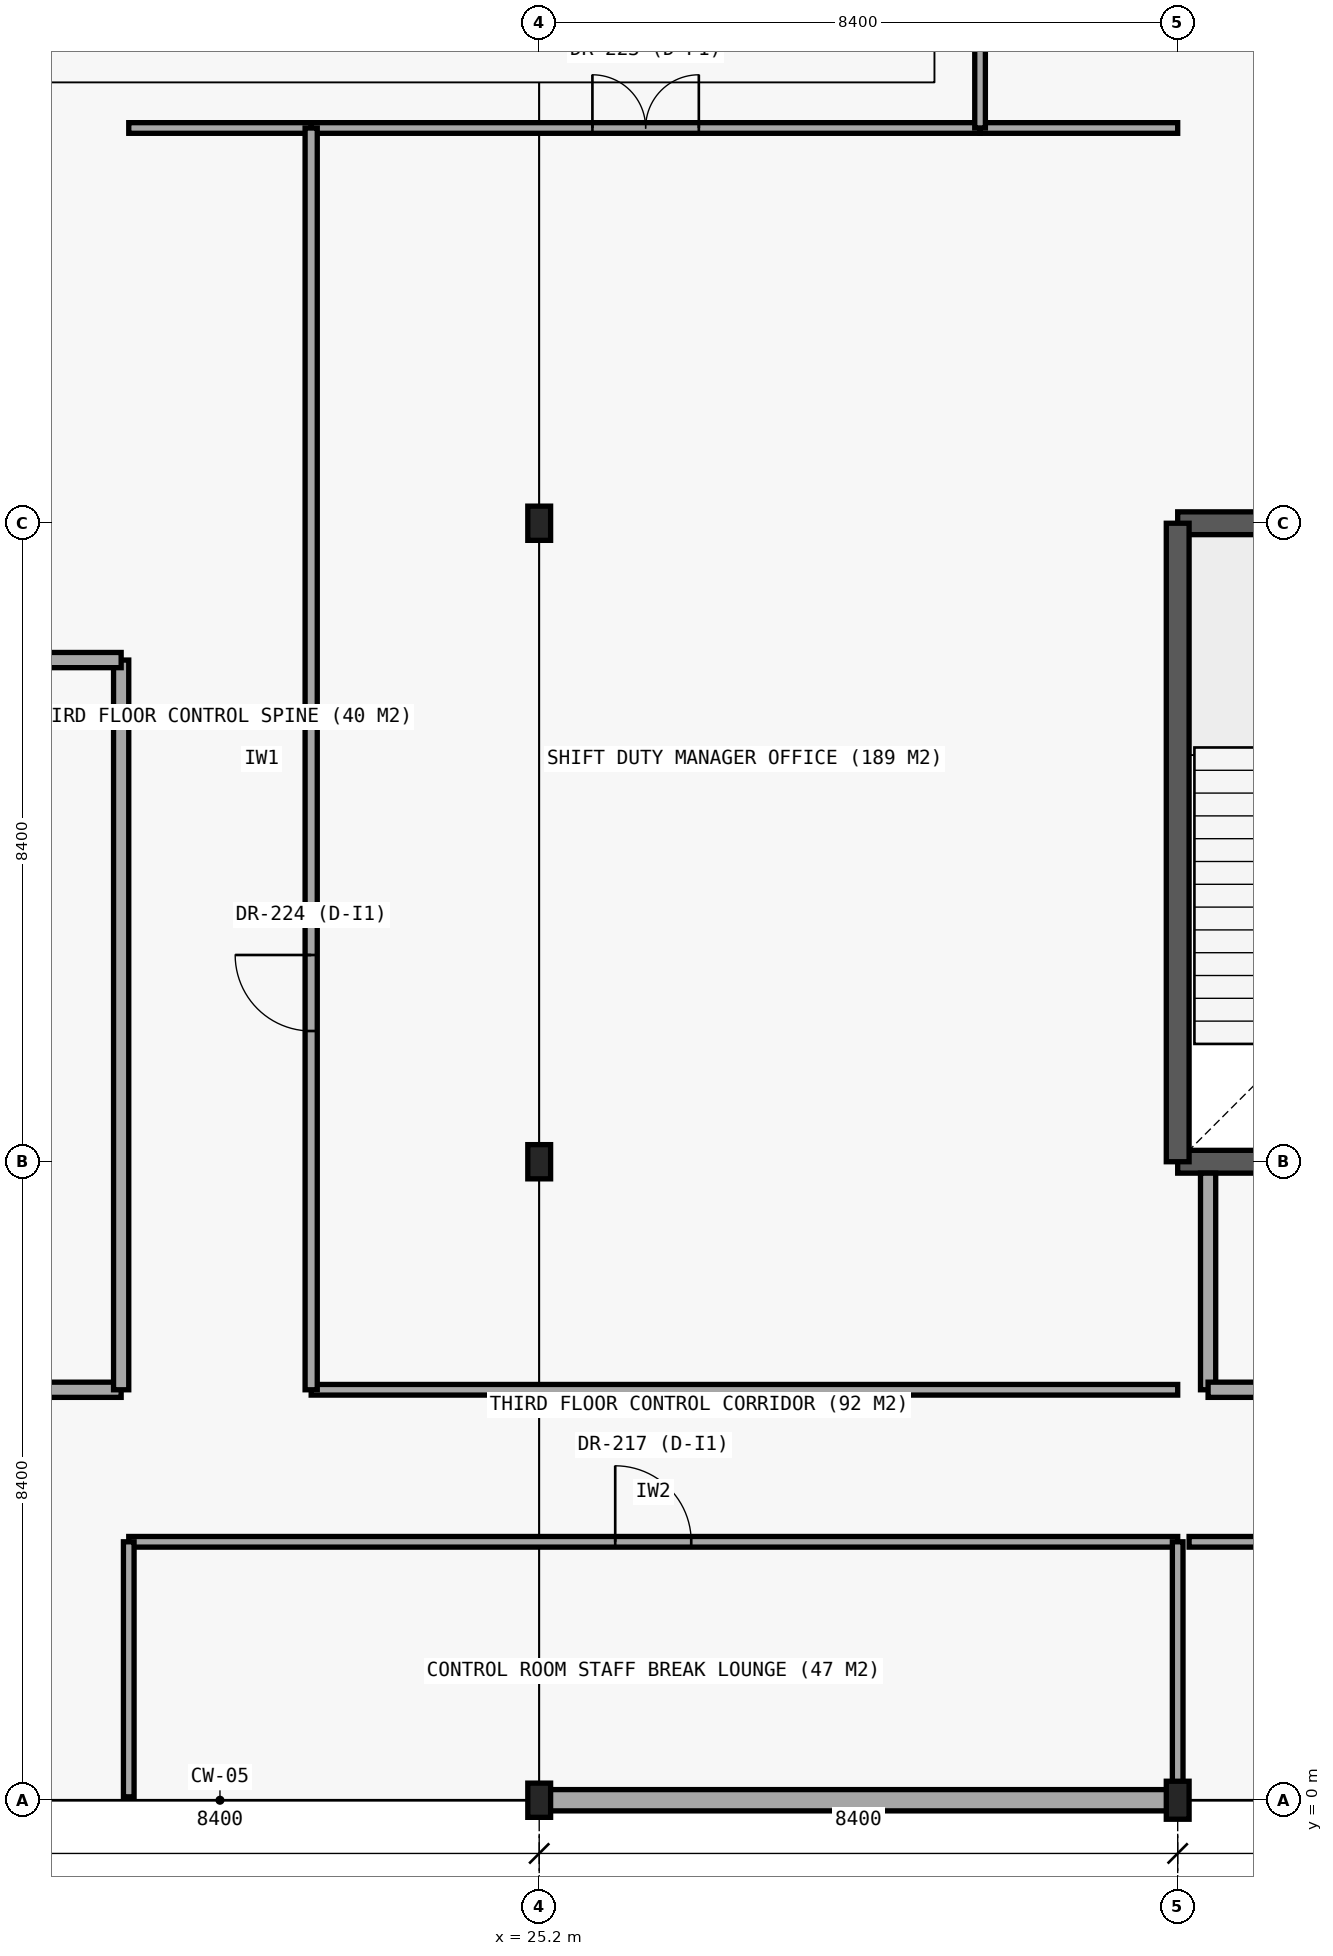
"""IFC4 building model, lengths in metres.
Left out: names, types, materials, properties, quantities, classifications, styles, units other than length and angle.
Written with IfcOpenShell. Run it as: python <this file> out.ifc"""

import sys

from ifc_helpers import new_model, si_unit, direction, frame, frame_2d, origin, origin_2d, place, context, subcontext, project, spatial, rectangle, i_section, extrude, element, fill, save


model = new_model("IFC4")
c1 = context("Model", 3, precision=1e-05, world=origin(), true_north=direction((0.0, 1.0)))
c2 = subcontext(c1, "Body", "Model", "MODEL_VIEW")
j1 = project(units=[si_unit("LENGTHUNIT", "METRE"), si_unit("PLANEANGLEUNIT", "RADIAN")], contexts=[c1])
p1 = place(None, origin())
s1 = spatial("IfcSite", under=j1, at=p1, CompositionType="ELEMENT")
p2 = place(p1, origin())
s2 = spatial("IfcBuilding", under=s1, at=p2, CompositionType="ELEMENT")
p3 = place(p2, frame((0.0, 0.0, 13.2)))
s3 = spatial("IfcBuildingStorey", under=s2, at=p3, CompositionType="ELEMENT", Elevation=13.2)
p4 = place(p3, frame((33.6, 8.4, 0.0), z_axis=(0.0, 0.0, 1.0), x_axis=(1.0, 0.0, 0.0)))
e1 = element("IfcWall", 1, at=p4, inside=s3, PredefinedType="SHEAR", context=c2, shape_type="SweptSolid", body=[
    extrude(rectangle(XDim=8.4, YDim=0.3, at=frame_2d((4.2, 0.0))), origin(), (0.0, 0.0, 1.0), 4.2),
])
p5 = place(p4, frame((1.8, 0.0, 0.0)))
e2 = element("IfcOpeningElement", 2, at=p5, cuts=e1, PredefinedType="OPENING", context=c2, shape_type="SweptSolid", body=[
    extrude(rectangle(XDim=1.35, YDim=2.2, at=frame_2d((0.675, 1.1))), frame((0.0, 0.16, 0.0), z_axis=(0.0, -1.0, 0.0), x_axis=(1.0, 0.0, 0.0)), (0.0, 0.0, 1.0), 0.32),
])
p6 = place(p4, frame((6.0, 0.0, 0.0)))
e3 = element("IfcOpeningElement", 3, at=p6, cuts=e1, PredefinedType="OPENING", context=c2, shape_type="SweptSolid", body=[
    extrude(rectangle(XDim=1.1, YDim=2.2, at=frame_2d((0.55, 1.1))), frame((0.0, 0.16, 0.0), z_axis=(0.0, -1.0, 0.0), x_axis=(1.0, 0.0, 0.0)), (0.0, 0.0, 1.0), 0.32),
])
p7 = place(p3, frame((42.0, 16.8, 0.0), z_axis=(0.0, 0.0, 1.0), x_axis=(-1.0, 0.0, 0.0)))
e4 = element("IfcWall", 4, at=p7, inside=s3, PredefinedType="SHEAR", context=c2, shape_type="SweptSolid", body=[
    extrude(rectangle(XDim=8.4, YDim=0.3, at=frame_2d((4.2, 0.0))), origin(), (0.0, 0.0, 1.0), 4.2),
])
p8 = place(p3, frame((33.6, 16.8, 0.0), z_axis=(0.0, 0.0, 1.0), x_axis=(0.0, -1.0, 0.0)))
e5 = element("IfcWall", 5, at=p8, inside=s3, PredefinedType="SHEAR", context=c2, shape_type="SweptSolid", body=[
    extrude(rectangle(XDim=8.4, YDim=0.3, at=frame_2d((4.2, 0.0))), origin(), (0.0, 0.0, 1.0), 4.2),
])
for number, where, z_axis, x_axis in (
    (6, (25.2, 0.0, 0.0), (0.0, 0.0, 1.0), (1.0, 0.0, 0.0)),
    (7, (25.2, 8.4, 0.0), (0.0, 0.0, 1.0), (1.0, 0.0, 0.0)),
    (8, (25.2, 16.8, 0.0), (0.0, 0.0, 1.0), (1.0, 0.0, 0.0)),
):
    element("IfcColumn", number, at=place(p3, frame(where, z_axis=z_axis, x_axis=x_axis)), inside=s3, PredefinedType="COLUMN", context=c2, shape_type="SweptSolid", body=[
        extrude(i_section(OverallWidth=0.3, OverallDepth=0.45, WebThickness=0.014, FlangeThickness=0.026, FilletRadius=0.027, at=origin_2d()), origin(), (0.0, 0.0, 1.0), 4.2),
    ])
p9 = place(p3, frame((33.6, 0.0, 0.0), z_axis=(0.0, 0.0, 1.0), x_axis=(1.0, 0.0, 0.0)))
e9 = element("IfcColumn", 9, at=p9, inside=s3, PredefinedType="COLUMN", context=c2, shape_type="SweptSolid", body=[
    extrude(i_section(OverallWidth=0.3, OverallDepth=0.5, WebThickness=0.014, FlangeThickness=0.028, FilletRadius=0.027, at=origin_2d()), origin(), (0.0, 0.0, 1.0), 4.2),
])
p10 = place(p3, frame((25.2, 0.0, 0.0), z_axis=(0.0, 0.0, 1.0), x_axis=(1.0, 0.0, 0.0)))
e10 = element("IfcWall", 10, at=p10, inside=s3, PredefinedType="STANDARD", context=c2, shape_type="SweptSolid", body=[
    extrude(rectangle(XDim=8.4, YDim=0.28, at=frame_2d((4.2, 0.0))), origin(), (0.0, 0.0, 1.0), 3.62),
])
p11 = place(p3, frame((8.8, 5.4, 0.0), z_axis=(0.0, 0.0, 1.0), x_axis=(1.0, 0.0, 0.0)))
e11 = element("IfcWall", 11, at=p11, inside=s3, PredefinedType="PARTITIONING", context=c2, shape_type="SweptSolid", body=[
    extrude(rectangle(XDim=10.9, YDim=0.2, at=frame_2d((5.45, 0.0))), origin(), (0.0, 0.0, 1.0), 3.52),
])
p12 = place(p11, frame((3.2, 0.0, 0.0)))
e12 = element("IfcOpeningElement", 12, at=p12, cuts=e11, PredefinedType="OPENING", context=c2, shape_type="SweptSolid", body=[
    extrude(rectangle(XDim=1.5, YDim=2.2, at=frame_2d((0.75, 1.1))), frame((0.0, 0.11, 0.0), z_axis=(0.0, -1.0, 0.0), x_axis=(1.0, 0.0, 0.0)), (0.0, 0.0, 1.0), 0.22),
])
p13 = place(p3, frame((19.7, 5.4, 0.0), z_axis=(0.0, 0.0, 1.0), x_axis=(0.0, 1.0, 0.0)))
e13 = element("IfcWall", 13, at=p13, inside=s3, PredefinedType="PARTITIONING", context=c2, shape_type="SweptSolid", body=[
    extrude(rectangle(XDim=9.6, YDim=0.2, at=frame_2d((4.8, 0.0))), origin(), (0.0, 0.0, 1.0), 3.52),
])
p14 = place(p3, frame((16.96, 15.0, 0.0), z_axis=(0.0, 0.0, 1.0), x_axis=(1.0, 0.0, 0.0)))
e14 = element("IfcWall", 14, at=p14, inside=s3, PredefinedType="PARTITIONING", context=c2, shape_type="SweptSolid", body=[
    extrude(rectangle(XDim=2.74, YDim=0.2, at=frame_2d((1.37, 0.0))), origin(), (0.0, 0.0, 1.0), 3.52),
])
p15 = place(p3, frame((34.0, 5.4, 0.0), z_axis=(0.0, 0.0, 1.0), x_axis=(0.0, 1.0, 0.0)))
e15 = element("IfcWall", 15, at=p15, inside=s3, PredefinedType="PARTITIONING", context=c2, shape_type="SweptSolid", body=[
    extrude(rectangle(XDim=2.85, YDim=0.2, at=frame_2d((1.425, 0.0))), origin(), (0.0, 0.0, 1.0), 3.49),
])
p16 = place(p3, frame((34.0, 5.4, 0.0), z_axis=(0.0, 0.0, 1.0), x_axis=(1.0, 0.0, 0.0)))
e16 = element("IfcWall", 16, at=p16, inside=s3, PredefinedType="PARTITIONING", context=c2, shape_type="SweptSolid", body=[
    extrude(rectangle(XDim=7.6, YDim=0.2, at=frame_2d((3.8, 0.0))), origin(), (0.0, 0.0, 1.0), 3.52),
])
p17 = place(p16, frame((3.05, 0.0, 0.0)))
e17 = element("IfcOpeningElement", 17, at=p17, cuts=e16, PredefinedType="OPENING", context=c2, shape_type="SweptSolid", body=[
    extrude(rectangle(XDim=1.5, YDim=2.2, at=frame_2d((0.75, 1.1))), frame((0.0, 0.11, 0.0), z_axis=(0.0, -1.0, 0.0), x_axis=(1.0, 0.0, 0.0)), (0.0, 0.0, 1.0), 0.22),
])
p18 = place(p3, frame((19.8, 3.4, 0.0), z_axis=(0.0, 0.0, 1.0), x_axis=(1.0, 0.0, 0.0)))
e18 = element("IfcWall", 18, at=p18, inside=s3, PredefinedType="PARTITIONING", context=c2, shape_type="SweptSolid", body=[
    extrude(rectangle(XDim=13.8, YDim=0.14, at=frame_2d((6.9, 0.0))), origin(), (0.0, 0.0, 1.0), 3.5),
])
p19 = place(p18, frame((6.4, 0.0, 0.0)))
e19 = element("IfcOpeningElement", 19, at=p19, cuts=e18, PredefinedType="OPENING", context=c2, shape_type="SweptSolid", body=[
    extrude(rectangle(XDim=1.0, YDim=2.15, at=frame_2d((0.5, 1.075))), frame((0.0, 0.08, 0.0), z_axis=(0.0, -1.0, 0.0), x_axis=(1.0, 0.0, 0.0)), (0.0, 0.0, 1.0), 0.16),
])
p20 = place(p3, frame((33.75, 3.4, 0.0), z_axis=(0.0, 0.0, 1.0), x_axis=(1.0, 0.0, 0.0)))
e20 = element("IfcWall", 20, at=p20, inside=s3, PredefinedType="PARTITIONING", context=c2, shape_type="SweptSolid", body=[
    extrude(rectangle(XDim=8.25, YDim=0.14, at=frame_2d((4.125, 0.0))), origin(), (0.0, 0.0, 1.0), 3.5),
])
p21 = place(p20, frame((1.92, 0.0, 0.0)))
e21 = element("IfcOpeningElement", 21, at=p21, cuts=e20, PredefinedType="OPENING", context=c2, shape_type="SweptSolid", body=[
    extrude(rectangle(XDim=1.15, YDim=2.15, at=frame_2d((0.575, 1.075))), frame((0.0, 0.08, 0.0), z_axis=(0.0, -1.0, 0.0), x_axis=(1.0, 0.0, 0.0)), (0.0, 0.0, 1.0), 0.16),
])
p22 = place(p3, frame((22.2, 5.4, 0.0), z_axis=(0.0, 0.0, 1.0), x_axis=(1.0, 0.0, 0.0)))
e22 = element("IfcWall", 22, at=p22, inside=s3, PredefinedType="PARTITIONING", context=c2, shape_type="SweptSolid", body=[
    extrude(rectangle(XDim=11.4, YDim=0.14, at=frame_2d((5.7, 0.0))), origin(), (0.0, 0.0, 1.0), 3.5),
])
p23 = place(p3, frame((19.8, 22.0, 0.0), z_axis=(0.0, 0.0, 1.0), x_axis=(1.0, 0.0, 0.0)))
e23 = element("IfcWall", 23, at=p23, inside=s3, PredefinedType="PARTITIONING", context=c2, shape_type="SweptSolid", body=[
    extrude(rectangle(XDim=2.4, YDim=0.14, at=frame_2d((1.2, 0.0))), origin(), (0.0, 0.0, 1.0), 3.5),
])
p24 = place(p3, frame((22.2, 22.0, 0.0), z_axis=(0.0, 0.0, 1.0), x_axis=(1.0, 0.0, 0.0)))
e24 = element("IfcWall", 24, at=p24, inside=s3, PredefinedType="PARTITIONING", context=c2, shape_type="SweptSolid", body=[
    extrude(rectangle(XDim=8.8, YDim=0.14, at=frame_2d((4.4, 0.0))), origin(), (0.0, 0.0, 1.0), 3.5),
])
p25 = place(p24, frame((3.7, 0.0, 0.0)))
e25 = element("IfcOpeningElement", 25, at=p25, cuts=e24, PredefinedType="OPENING", context=c2, shape_type="SweptSolid", body=[
    extrude(rectangle(XDim=1.4, YDim=2.25, at=frame_2d((0.7, 1.125))), frame((0.0, 0.08, 0.0), z_axis=(0.0, -1.0, 0.0), x_axis=(1.0, 0.0, 0.0)), (0.0, 0.0, 1.0), 0.16),
])
p26 = place(p3, frame((31.0, 22.0, 0.0), z_axis=(0.0, 0.0, 1.0), x_axis=(1.0, 0.0, 0.0)))
e26 = element("IfcWall", 26, at=p26, inside=s3, PredefinedType="PARTITIONING", context=c2, shape_type="SweptSolid", body=[
    extrude(rectangle(XDim=2.6, YDim=0.14, at=frame_2d((1.3, 0.0))), origin(), (0.0, 0.0, 1.0), 3.5),
])
p27 = place(p3, frame((19.8, 0.045, 0.0), z_axis=(0.0, 0.0, 1.0), x_axis=(0.0, 1.0, 0.0)))
e27 = element("IfcWall", 27, at=p27, inside=s3, PredefinedType="PARTITIONING", context=c2, shape_type="SweptSolid", body=[
    extrude(rectangle(XDim=3.355, YDim=0.14, at=frame_2d((1.677, 0.0))), origin(), (0.0, 0.0, 1.0), 3.5),
])
p28 = place(p3, frame((22.2, 5.4, 0.0), z_axis=(0.0, 0.0, 1.0), x_axis=(0.0, 1.0, 0.0)))
e28 = element("IfcWall", 28, at=p28, inside=s3, PredefinedType="PARTITIONING", context=c2, shape_type="SweptSolid", body=[
    extrude(rectangle(XDim=16.6, YDim=0.16, at=frame_2d((8.3, 0.0))), origin(), (0.0, 0.0, 1.0), 3.5),
])
p29 = place(p28, frame((4.72, 0.0, 0.0)))
e29 = element("IfcOpeningElement", 29, at=p29, cuts=e28, PredefinedType="OPENING", context=c2, shape_type="SweptSolid", body=[
    extrude(rectangle(XDim=1.0, YDim=2.15, at=frame_2d((0.5, 1.075))), frame((0.0, 0.09, 0.0), z_axis=(0.0, -1.0, 0.0), x_axis=(1.0, 0.0, 0.0)), (0.0, 0.0, 1.0), 0.18),
])
p30 = place(p3, frame((31.0, 22.0, 0.0), z_axis=(0.0, 0.0, 1.0), x_axis=(0.0, 1.0, 0.0)))
e30 = element("IfcWall", 30, at=p30, inside=s3, PredefinedType="PARTITIONING", context=c2, shape_type="SweptSolid", body=[
    extrude(rectangle(XDim=3.05, YDim=0.14, at=frame_2d((1.525, 0.0))), origin(), (0.0, 0.0, 1.0), 3.5),
])
p31 = place(p3, frame((33.6, 0.145, 0.0), z_axis=(0.0, 0.0, 1.0), x_axis=(0.0, 1.0, 0.0)))
e31 = element("IfcWall", 31, at=p31, inside=s3, PredefinedType="PARTITIONING", context=c2, shape_type="SweptSolid", body=[
    extrude(rectangle(XDim=3.255, YDim=0.14, at=frame_2d((1.627, 0.0))), origin(), (0.0, 0.0, 1.0), 3.49),
])
p32 = place(p19, origin())
e32 = element("IfcDoor", 32, at=p32, inside=s3, OperationType="SINGLE_SWING_LEFT", PredefinedType="DOOR", context=c2, shape_type="SweptSolid", body=[
    extrude(rectangle(XDim=1.0, YDim=2.15, at=frame_2d((0.5, 1.075))), frame((0.0, 0.025, 0.0), z_axis=(0.0, -1.0, 0.0), x_axis=(1.0, 0.0, 0.0)), (0.0, 0.0, 1.0), 0.05),
])
fill(e19, e32)
p33 = place(p25, origin())
e33 = element("IfcDoor", 33, at=p33, inside=s3, OperationType="DOUBLE_DOOR_SINGLE_SWING", PredefinedType="DOOR", context=c2, shape_type="SweptSolid", body=[
    extrude(rectangle(XDim=1.4, YDim=2.25, at=frame_2d((0.7, 1.125))), frame((0.0, 0.025, 0.0), z_axis=(0.0, -1.0, 0.0), x_axis=(1.0, 0.0, 0.0)), (0.0, 0.0, 1.0), 0.05),
])
fill(e25, e33)
p34 = place(p29, origin())
e34 = element("IfcDoor", 34, at=p34, inside=s3, OperationType="SINGLE_SWING_RIGHT", PredefinedType="DOOR", context=c2, shape_type="SweptSolid", body=[
    extrude(rectangle(XDim=1.0, YDim=2.15, at=frame_2d((0.5, 1.075))), frame((0.0, 0.025, 0.0), z_axis=(0.0, -1.0, 0.0), x_axis=(1.0, 0.0, 0.0)), (0.0, 0.0, 1.0), 0.05),
])
fill(e29, e34)
save(model, sys.argv[1])
